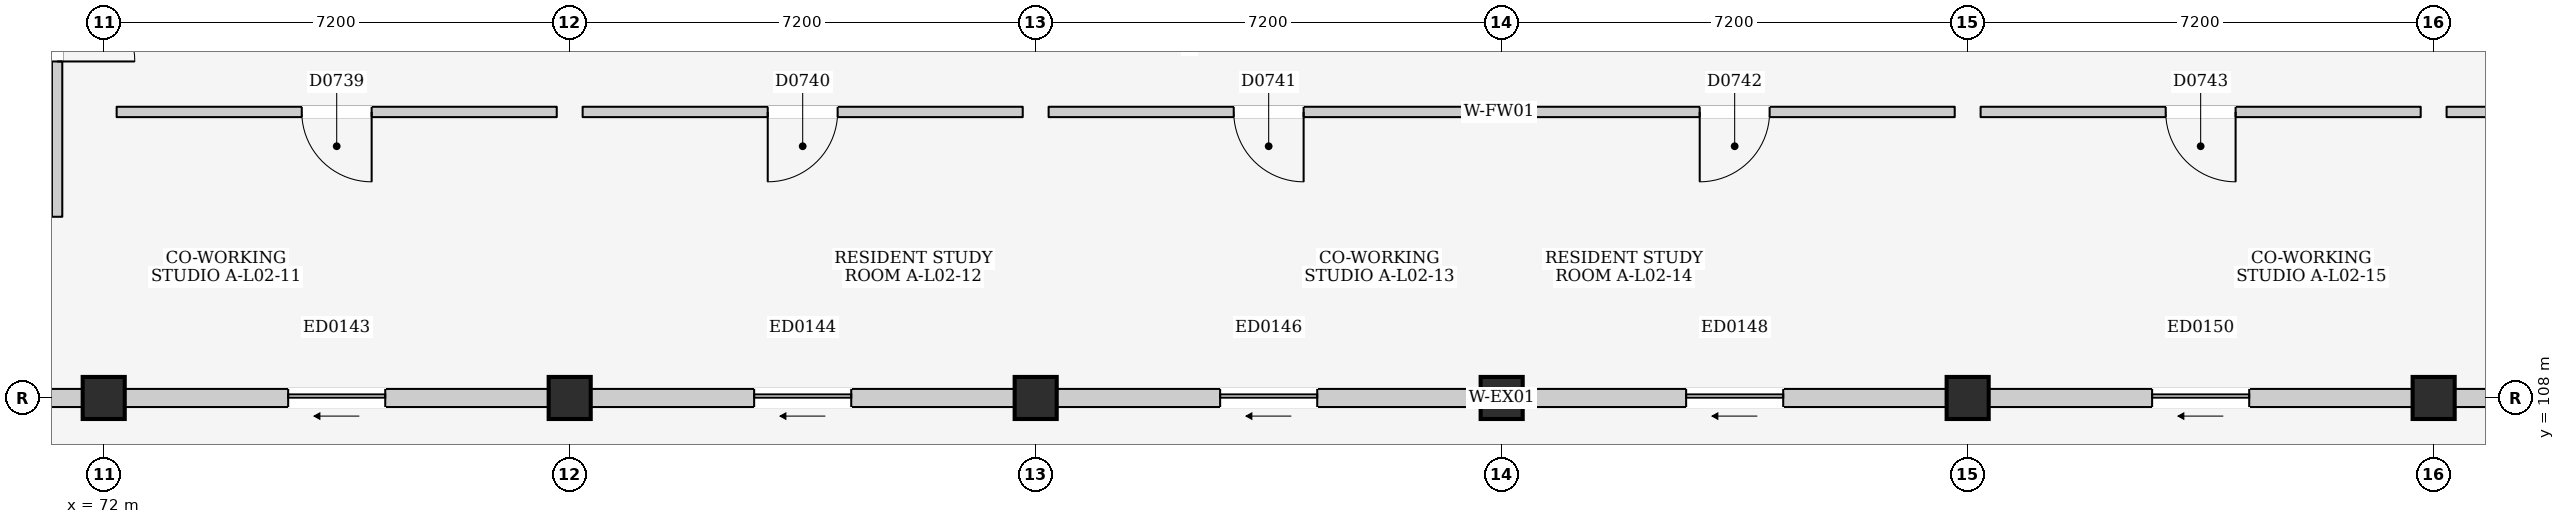
"""IFC4 building model, lengths in metres.
Left out: names, types, materials, properties, quantities, classifications, styles, units other than length and angle.
Written with IfcOpenShell. Run it as: python <this file> out.ifc"""

import sys

from ifc_helpers import new_model, si_unit, direction, frame, frame_2d, origin, origin_2d, place, context, subcontext, project, spatial, rectangle, extrude, element, fill, save


model = new_model("IFC4")
c1 = context("Model", 3, precision=1e-05, world=origin(), true_north=direction((0.0, 1.0)))
c2 = subcontext(c1, "Body", "Model", "MODEL_VIEW")
j1 = project(units=[si_unit("LENGTHUNIT", "METRE"), si_unit("PLANEANGLEUNIT", "RADIAN")], contexts=[c1])
p1 = place(None, origin())
s1 = spatial("IfcSite", under=j1, at=p1, CompositionType="ELEMENT")
p2 = place(p1, origin())
s2 = spatial("IfcBuilding", under=s1, at=p2, CompositionType="ELEMENT")
p3 = place(p2, frame((0.0, 0.0, 9.0)))
s3 = spatial("IfcBuildingStorey", under=s2, at=p3, CompositionType="ELEMENT", Elevation=9.0)
for number, where, z_axis, x_axis in (
    (1, (72.0, 108.0, 0.0), (0.0, 0.0, 1.0), (1.0, 0.0, 0.0)),
    (2, (79.2, 108.0, 0.0), (0.0, 0.0, 1.0), (1.0, 0.0, 0.0)),
    (3, (86.4, 108.0, 0.0), (0.0, 0.0, 1.0), (1.0, 0.0, 0.0)),
    (4, (93.6, 108.0, 0.0), (0.0, 0.0, 1.0), (1.0, 0.0, 0.0)),
    (5, (100.8, 108.0, 0.0), (0.0, 0.0, 1.0), (1.0, 0.0, 0.0)),
    (6, (108.0, 108.0, 0.0), (0.0, 0.0, 1.0), (1.0, 0.0, 0.0)),
):
    element("IfcColumn", number, at=place(p3, frame(where, z_axis=z_axis, x_axis=x_axis)), inside=s3, PredefinedType="COLUMN", context=c2, shape_type="SweptSolid", body=[
        extrude(rectangle(XDim=0.65, YDim=0.65, at=origin_2d()), origin(), (0.0, 0.0, 1.0), 3.2),
    ])
p4 = place(p3, frame((65.125, 108.0, 0.0), z_axis=(0.0, 0.0, 1.0), x_axis=(1.0, 0.0, 0.0)))
e7 = element("IfcWall", 7, at=p4, inside=s3, PredefinedType="ELEMENTEDWALL", context=c2, shape_type="SweptSolid", body=[
    extrude(rectangle(XDim=6.55, YDim=0.28, at=frame_2d((3.275, 0.0))), origin(), (0.0, 0.0, 1.0), 2.295),
])
p5 = place(p4, frame((2.775, 0.0, 1.2)))
e8 = element("IfcOpeningElement", 8, at=p5, cuts=e7, PredefinedType="OPENING", context=c2, shape_type="SweptSolid", body=[
    extrude(rectangle(XDim=1.0, YDim=0.9, at=frame_2d((0.5, 0.45))), frame((0.0, 0.155, 0.0), z_axis=(0.0, -1.0, 0.0), x_axis=(1.0, 0.0, 0.0)), (0.0, 0.0, 1.0), 0.31),
])
p6 = place(p3, frame((72.325, 108.0, 0.0), z_axis=(0.0, 0.0, 1.0), x_axis=(1.0, 0.0, 0.0)))
e9 = element("IfcWall", 9, at=p6, inside=s3, PredefinedType="ELEMENTEDWALL", context=c2, shape_type="SweptSolid", body=[
    extrude(rectangle(XDim=6.55, YDim=0.28, at=frame_2d((3.275, 0.0))), origin(), (0.0, 0.0, 1.0), 2.295),
])
p7 = place(p6, frame((2.525, 0.0, 0.0)))
e10 = element("IfcOpeningElement", 10, at=p7, cuts=e9, PredefinedType="OPENING", context=c2, shape_type="SweptSolid", body=[
    extrude(rectangle(XDim=1.5, YDim=2.12, at=frame_2d((0.75, 1.06))), frame((0.0, 0.155, 0.0), z_axis=(0.0, -1.0, 0.0), x_axis=(1.0, 0.0, 0.0)), (0.0, 0.0, 1.0), 0.31),
])
p8 = place(p3, frame((79.525, 108.0, 0.0), z_axis=(0.0, 0.0, 1.0), x_axis=(1.0, 0.0, 0.0)))
e11 = element("IfcWall", 11, at=p8, inside=s3, PredefinedType="ELEMENTEDWALL", context=c2, shape_type="SweptSolid", body=[
    extrude(rectangle(XDim=6.55, YDim=0.28, at=frame_2d((3.275, 0.0))), origin(), (0.0, 0.0, 1.0), 2.295),
])
p9 = place(p8, frame((2.525, 0.0, 0.0)))
e12 = element("IfcOpeningElement", 12, at=p9, cuts=e11, PredefinedType="OPENING", context=c2, shape_type="SweptSolid", body=[
    extrude(rectangle(XDim=1.5, YDim=2.12, at=frame_2d((0.75, 1.06))), frame((0.0, 0.155, 0.0), z_axis=(0.0, -1.0, 0.0), x_axis=(1.0, 0.0, 0.0)), (0.0, 0.0, 1.0), 0.31),
])
p10 = place(p3, frame((86.725, 108.0, 0.0), z_axis=(0.0, 0.0, 1.0), x_axis=(1.0, 0.0, 0.0)))
e13 = element("IfcWall", 13, at=p10, inside=s3, PredefinedType="ELEMENTEDWALL", context=c2, shape_type="SweptSolid", body=[
    extrude(rectangle(XDim=6.55, YDim=0.28, at=frame_2d((3.275, 0.0))), origin(), (0.0, 0.0, 1.0), 2.295),
])
p11 = place(p10, frame((2.525, 0.0, 0.0)))
e14 = element("IfcOpeningElement", 14, at=p11, cuts=e13, PredefinedType="OPENING", context=c2, shape_type="SweptSolid", body=[
    extrude(rectangle(XDim=1.5, YDim=2.12, at=frame_2d((0.75, 1.06))), frame((0.0, 0.155, 0.0), z_axis=(0.0, -1.0, 0.0), x_axis=(1.0, 0.0, 0.0)), (0.0, 0.0, 1.0), 0.31),
])
p12 = place(p3, frame((93.925, 108.0, 0.0), z_axis=(0.0, 0.0, 1.0), x_axis=(1.0, 0.0, 0.0)))
e15 = element("IfcWall", 15, at=p12, inside=s3, PredefinedType="ELEMENTEDWALL", context=c2, shape_type="SweptSolid", body=[
    extrude(rectangle(XDim=6.55, YDim=0.28, at=frame_2d((3.275, 0.0))), origin(), (0.0, 0.0, 1.0), 2.295),
])
p13 = place(p12, frame((2.525, 0.0, 0.0)))
e16 = element("IfcOpeningElement", 16, at=p13, cuts=e15, PredefinedType="OPENING", context=c2, shape_type="SweptSolid", body=[
    extrude(rectangle(XDim=1.5, YDim=2.12, at=frame_2d((0.75, 1.06))), frame((0.0, 0.155, 0.0), z_axis=(0.0, -1.0, 0.0), x_axis=(1.0, 0.0, 0.0)), (0.0, 0.0, 1.0), 0.31),
])
p14 = place(p3, frame((101.125, 108.0, 0.0), z_axis=(0.0, 0.0, 1.0), x_axis=(1.0, 0.0, 0.0)))
e17 = element("IfcWall", 17, at=p14, inside=s3, PredefinedType="ELEMENTEDWALL", context=c2, shape_type="SweptSolid", body=[
    extrude(rectangle(XDim=6.55, YDim=0.28, at=frame_2d((3.275, 0.0))), origin(), (0.0, 0.0, 1.0), 2.295),
])
p15 = place(p14, frame((2.525, 0.0, 0.0)))
e18 = element("IfcOpeningElement", 18, at=p15, cuts=e17, PredefinedType="OPENING", context=c2, shape_type="SweptSolid", body=[
    extrude(rectangle(XDim=1.5, YDim=2.12, at=frame_2d((0.75, 1.06))), frame((0.0, 0.155, 0.0), z_axis=(0.0, -1.0, 0.0), x_axis=(1.0, 0.0, 0.0)), (0.0, 0.0, 1.0), 0.31),
])
p16 = place(p3, frame((108.325, 108.0, 0.0), z_axis=(0.0, 0.0, 1.0), x_axis=(1.0, 0.0, 0.0)))
e19 = element("IfcWall", 19, at=p16, inside=s3, PredefinedType="ELEMENTEDWALL", context=c2, shape_type="SweptSolid", body=[
    extrude(rectangle(XDim=6.55, YDim=0.28, at=frame_2d((3.275, 0.0))), origin(), (0.0, 0.0, 1.0), 2.295),
])
p17 = place(p16, frame((2.525, 0.0, 0.0)))
e20 = element("IfcOpeningElement", 20, at=p17, cuts=e19, PredefinedType="OPENING", context=c2, shape_type="SweptSolid", body=[
    extrude(rectangle(XDim=1.5, YDim=2.12, at=frame_2d((0.75, 1.06))), frame((0.0, 0.155, 0.0), z_axis=(0.0, -1.0, 0.0), x_axis=(1.0, 0.0, 0.0)), (0.0, 0.0, 1.0), 0.31),
])
p18 = place(p3, frame((71.28, 110.8, 0.0), z_axis=(0.0, 0.0, 1.0), x_axis=(0.0, 1.0, 0.0)))
e21 = element("IfcWall", 21, at=p18, inside=s3, PredefinedType="PARTITIONING", context=c2, shape_type="SweptSolid", body=[
    extrude(rectangle(XDim=4.32, YDim=0.16, at=frame_2d((2.16, 0.0))), origin(), (0.0, 0.0, 1.0), 2.96),
])
p19 = place(p18, frame((2.4, 0.0, 0.0)))
e22 = element("IfcOpeningElement", 22, at=p19, cuts=e21, PredefinedType="OPENING", context=c2, shape_type="SweptSolid", body=[
    extrude(rectangle(XDim=1.2, YDim=2.2, at=frame_2d((0.6, 1.1))), frame((0.0, 0.095, 0.0), z_axis=(0.0, -1.0, 0.0), x_axis=(1.0, 0.0, 0.0)), (0.0, 0.0, 1.0), 0.19),
])
p20 = place(p3, frame((72.2, 112.42, 0.0), z_axis=(0.0, 0.0, 1.0), x_axis=(1.0, 0.0, 0.0)))
e23 = element("IfcWall", 23, at=p20, inside=s3, PredefinedType="PARTITIONING", context=c2, shape_type="SweptSolid", body=[
    extrude(rectangle(XDim=6.8, YDim=0.16, at=frame_2d((3.4, 0.0))), origin(), (0.0, 0.0, 1.0), 2.96),
])
p21 = place(p20, frame((2.86, 0.0, 0.0)))
e24 = element("IfcOpeningElement", 24, at=p21, cuts=e23, PredefinedType="OPENING", context=c2, shape_type="SweptSolid", body=[
    extrude(rectangle(XDim=1.08, YDim=2.22, at=frame_2d((0.54, 1.11))), frame((0.0, 0.095, 0.0), z_axis=(0.0, -1.0, 0.0), x_axis=(1.0, 0.0, 0.0)), (0.0, 0.0, 1.0), 0.19),
])
p22 = place(p3, frame((79.4, 112.42, 0.0), z_axis=(0.0, 0.0, 1.0), x_axis=(1.0, 0.0, 0.0)))
e25 = element("IfcWall", 25, at=p22, inside=s3, PredefinedType="PARTITIONING", context=c2, shape_type="SweptSolid", body=[
    extrude(rectangle(XDim=6.8, YDim=0.16, at=frame_2d((3.4, 0.0))), origin(), (0.0, 0.0, 1.0), 2.96),
])
p23 = place(p22, frame((2.86, 0.0, 0.0)))
e26 = element("IfcOpeningElement", 26, at=p23, cuts=e25, PredefinedType="OPENING", context=c2, shape_type="SweptSolid", body=[
    extrude(rectangle(XDim=1.08, YDim=2.22, at=frame_2d((0.54, 1.11))), frame((0.0, 0.095, 0.0), z_axis=(0.0, -1.0, 0.0), x_axis=(1.0, 0.0, 0.0)), (0.0, 0.0, 1.0), 0.19),
])
p24 = place(p3, frame((86.6, 112.42, 0.0), z_axis=(0.0, 0.0, 1.0), x_axis=(1.0, 0.0, 0.0)))
e27 = element("IfcWall", 27, at=p24, inside=s3, PredefinedType="PARTITIONING", context=c2, shape_type="SweptSolid", body=[
    extrude(rectangle(XDim=6.8, YDim=0.16, at=frame_2d((3.4, 0.0))), origin(), (0.0, 0.0, 1.0), 2.96),
])
p25 = place(p24, frame((2.86, 0.0, 0.0)))
e28 = element("IfcOpeningElement", 28, at=p25, cuts=e27, PredefinedType="OPENING", context=c2, shape_type="SweptSolid", body=[
    extrude(rectangle(XDim=1.08, YDim=2.22, at=frame_2d((0.54, 1.11))), frame((0.0, 0.095, 0.0), z_axis=(0.0, -1.0, 0.0), x_axis=(1.0, 0.0, 0.0)), (0.0, 0.0, 1.0), 0.19),
])
p26 = place(p3, frame((93.8, 112.42, 0.0), z_axis=(0.0, 0.0, 1.0), x_axis=(1.0, 0.0, 0.0)))
e29 = element("IfcWall", 29, at=p26, inside=s3, PredefinedType="PARTITIONING", context=c2, shape_type="SweptSolid", body=[
    extrude(rectangle(XDim=6.8, YDim=0.16, at=frame_2d((3.4, 0.0))), origin(), (0.0, 0.0, 1.0), 2.96),
])
p27 = place(p26, frame((2.86, 0.0, 0.0)))
e30 = element("IfcOpeningElement", 30, at=p27, cuts=e29, PredefinedType="OPENING", context=c2, shape_type="SweptSolid", body=[
    extrude(rectangle(XDim=1.08, YDim=2.22, at=frame_2d((0.54, 1.11))), frame((0.0, 0.095, 0.0), z_axis=(0.0, -1.0, 0.0), x_axis=(1.0, 0.0, 0.0)), (0.0, 0.0, 1.0), 0.19),
])
p28 = place(p3, frame((101.0, 112.42, 0.0), z_axis=(0.0, 0.0, 1.0), x_axis=(1.0, 0.0, 0.0)))
e31 = element("IfcWall", 31, at=p28, inside=s3, PredefinedType="PARTITIONING", context=c2, shape_type="SweptSolid", body=[
    extrude(rectangle(XDim=6.8, YDim=0.16, at=frame_2d((3.4, 0.0))), origin(), (0.0, 0.0, 1.0), 2.96),
])
p29 = place(p28, frame((2.86, 0.0, 0.0)))
e32 = element("IfcOpeningElement", 32, at=p29, cuts=e31, PredefinedType="OPENING", context=c2, shape_type="SweptSolid", body=[
    extrude(rectangle(XDim=1.08, YDim=2.22, at=frame_2d((0.54, 1.11))), frame((0.0, 0.095, 0.0), z_axis=(0.0, -1.0, 0.0), x_axis=(1.0, 0.0, 0.0)), (0.0, 0.0, 1.0), 0.19),
])
p30 = place(p3, frame((108.2, 112.42, 0.0), z_axis=(0.0, 0.0, 1.0), x_axis=(1.0, 0.0, 0.0)))
e33 = element("IfcWall", 33, at=p30, inside=s3, PredefinedType="PARTITIONING", context=c2, shape_type="SweptSolid", body=[
    extrude(rectangle(XDim=6.72, YDim=0.16, at=frame_2d((3.36, 0.0))), origin(), (0.0, 0.0, 1.0), 2.96),
])
p31 = place(p30, frame((2.82, 0.0, 0.0)))
e34 = element("IfcOpeningElement", 34, at=p31, cuts=e33, PredefinedType="OPENING", context=c2, shape_type="SweptSolid", body=[
    extrude(rectangle(XDim=1.08, YDim=2.22, at=frame_2d((0.54, 1.11))), frame((0.0, 0.095, 0.0), z_axis=(0.0, -1.0, 0.0), x_axis=(1.0, 0.0, 0.0)), (0.0, 0.0, 1.0), 0.19),
])
p32 = place(p7, frame((1.5, 0.0, 0.0), z_axis=(0.0, 0.0, 1.0), x_axis=(-1.0, 0.0, 0.0)))
e35 = element("IfcDoor", 35, at=p32, inside=s3, OperationType="SLIDING_TO_LEFT", PredefinedType="DOOR", context=c2, shape_type="SweptSolid", body=[
    extrude(rectangle(XDim=1.5, YDim=2.12, at=frame_2d((0.75, 1.06))), frame((0.0, 0.025, 0.0), z_axis=(0.0, -1.0, 0.0), x_axis=(1.0, 0.0, 0.0)), (0.0, 0.0, 1.0), 0.05),
])
fill(e10, e35)
p33 = place(p9, frame((1.5, 0.0, 0.0), z_axis=(0.0, 0.0, 1.0), x_axis=(-1.0, 0.0, 0.0)))
e36 = element("IfcDoor", 36, at=p33, inside=s3, OperationType="SLIDING_TO_LEFT", PredefinedType="DOOR", context=c2, shape_type="SweptSolid", body=[
    extrude(rectangle(XDim=1.5, YDim=2.12, at=frame_2d((0.75, 1.06))), frame((0.0, 0.025, 0.0), z_axis=(0.0, -1.0, 0.0), x_axis=(1.0, 0.0, 0.0)), (0.0, 0.0, 1.0), 0.05),
])
fill(e12, e36)
p34 = place(p11, frame((1.5, 0.0, 0.0), z_axis=(0.0, 0.0, 1.0), x_axis=(-1.0, 0.0, 0.0)))
e37 = element("IfcDoor", 37, at=p34, inside=s3, OperationType="SLIDING_TO_LEFT", PredefinedType="DOOR", context=c2, shape_type="SweptSolid", body=[
    extrude(rectangle(XDim=1.5, YDim=2.12, at=frame_2d((0.75, 1.06))), frame((0.0, 0.025, 0.0), z_axis=(0.0, -1.0, 0.0), x_axis=(1.0, 0.0, 0.0)), (0.0, 0.0, 1.0), 0.05),
])
fill(e14, e37)
p35 = place(p13, frame((1.5, 0.0, 0.0), z_axis=(0.0, 0.0, 1.0), x_axis=(-1.0, 0.0, 0.0)))
e38 = element("IfcDoor", 38, at=p35, inside=s3, OperationType="SLIDING_TO_LEFT", PredefinedType="DOOR", context=c2, shape_type="SweptSolid", body=[
    extrude(rectangle(XDim=1.5, YDim=2.12, at=frame_2d((0.75, 1.06))), frame((0.0, 0.025, 0.0), z_axis=(0.0, -1.0, 0.0), x_axis=(1.0, 0.0, 0.0)), (0.0, 0.0, 1.0), 0.05),
])
fill(e16, e38)
p36 = place(p15, frame((1.5, 0.0, 0.0), z_axis=(0.0, 0.0, 1.0), x_axis=(-1.0, 0.0, 0.0)))
e39 = element("IfcDoor", 39, at=p36, inside=s3, OperationType="SLIDING_TO_LEFT", PredefinedType="DOOR", context=c2, shape_type="SweptSolid", body=[
    extrude(rectangle(XDim=1.5, YDim=2.12, at=frame_2d((0.75, 1.06))), frame((0.0, 0.025, 0.0), z_axis=(0.0, -1.0, 0.0), x_axis=(1.0, 0.0, 0.0)), (0.0, 0.0, 1.0), 0.05),
])
fill(e18, e39)
p37 = place(p19, frame((1.2, 0.0, 0.0), z_axis=(0.0, 0.0, 1.0), x_axis=(-1.0, 0.0, 0.0)))
e40 = element("IfcDoor", 40, at=p37, inside=s3, OperationType="SINGLE_SWING_RIGHT", PredefinedType="DOOR", context=c2, shape_type="SweptSolid", body=[
    extrude(rectangle(XDim=1.2, YDim=2.2, at=frame_2d((0.6, 1.1))), frame((0.0, 0.025, 0.0), z_axis=(0.0, -1.0, 0.0), x_axis=(1.0, 0.0, 0.0)), (0.0, 0.0, 1.0), 0.05),
])
fill(e22, e40)
p38 = place(p21, frame((1.08, 0.0, 0.0), z_axis=(0.0, 0.0, 1.0), x_axis=(-1.0, 0.0, 0.0)))
e41 = element("IfcDoor", 41, at=p38, inside=s3, OperationType="SINGLE_SWING_LEFT", PredefinedType="DOOR", context=c2, shape_type="SweptSolid", body=[
    extrude(rectangle(XDim=1.08, YDim=2.22, at=frame_2d((0.54, 1.11))), frame((0.0, 0.025, 0.0), z_axis=(0.0, -1.0, 0.0), x_axis=(1.0, 0.0, 0.0)), (0.0, 0.0, 1.0), 0.05),
])
fill(e24, e41)
p39 = place(p23, frame((1.08, 0.0, 0.0), z_axis=(0.0, 0.0, 1.0), x_axis=(-1.0, 0.0, 0.0)))
e42 = element("IfcDoor", 42, at=p39, inside=s3, OperationType="SINGLE_SWING_RIGHT", PredefinedType="DOOR", context=c2, shape_type="SweptSolid", body=[
    extrude(rectangle(XDim=1.08, YDim=2.22, at=frame_2d((0.54, 1.11))), frame((0.0, 0.025, 0.0), z_axis=(0.0, -1.0, 0.0), x_axis=(1.0, 0.0, 0.0)), (0.0, 0.0, 1.0), 0.05),
])
fill(e26, e42)
p40 = place(p25, frame((1.08, 0.0, 0.0), z_axis=(0.0, 0.0, 1.0), x_axis=(-1.0, 0.0, 0.0)))
e43 = element("IfcDoor", 43, at=p40, inside=s3, OperationType="SINGLE_SWING_LEFT", PredefinedType="DOOR", context=c2, shape_type="SweptSolid", body=[
    extrude(rectangle(XDim=1.08, YDim=2.22, at=frame_2d((0.54, 1.11))), frame((0.0, 0.025, 0.0), z_axis=(0.0, -1.0, 0.0), x_axis=(1.0, 0.0, 0.0)), (0.0, 0.0, 1.0), 0.05),
])
fill(e28, e43)
p41 = place(p27, frame((1.08, 0.0, 0.0), z_axis=(0.0, 0.0, 1.0), x_axis=(-1.0, 0.0, 0.0)))
e44 = element("IfcDoor", 44, at=p41, inside=s3, OperationType="SINGLE_SWING_RIGHT", PredefinedType="DOOR", context=c2, shape_type="SweptSolid", body=[
    extrude(rectangle(XDim=1.08, YDim=2.22, at=frame_2d((0.54, 1.11))), frame((0.0, 0.025, 0.0), z_axis=(0.0, -1.0, 0.0), x_axis=(1.0, 0.0, 0.0)), (0.0, 0.0, 1.0), 0.05),
])
fill(e30, e44)
p42 = place(p29, frame((1.08, 0.0, 0.0), z_axis=(0.0, 0.0, 1.0), x_axis=(-1.0, 0.0, 0.0)))
e45 = element("IfcDoor", 45, at=p42, inside=s3, OperationType="SINGLE_SWING_LEFT", PredefinedType="DOOR", context=c2, shape_type="SweptSolid", body=[
    extrude(rectangle(XDim=1.08, YDim=2.22, at=frame_2d((0.54, 1.11))), frame((0.0, 0.025, 0.0), z_axis=(0.0, -1.0, 0.0), x_axis=(1.0, 0.0, 0.0)), (0.0, 0.0, 1.0), 0.05),
])
fill(e32, e45)
save(model, sys.argv[1])
